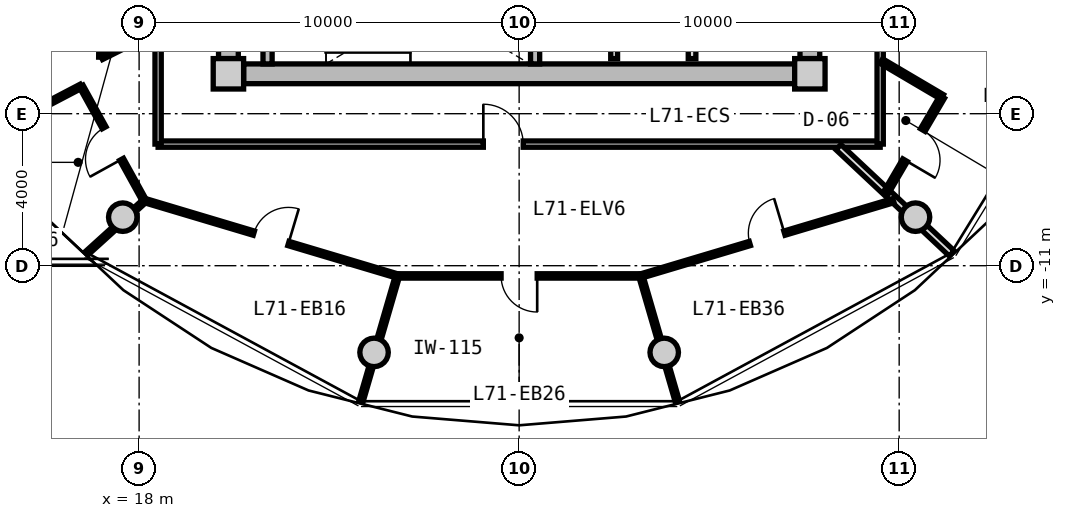
"""IFC4 building model, lengths in metres.
Left out: names, types, materials, properties, quantities, classifications, styles, units other than length and angle.
Written with IfcOpenShell. Run it as: python <this file> out.ifc"""

import sys

from ifc_helpers import new_model, si_unit, direction, frame, frame_2d, origin, origin_2d, place, context, subcontext, project, spatial, rectangle, circle, extrude, source, transform, mapped, element, fill, save


model = new_model("IFC4")
c1 = context("Model", 3, precision=1e-05, world=origin(), true_north=direction((0.0, 1.0)))
c2 = subcontext(c1, "Body", "Model", "MODEL_VIEW")
j1 = project(units=[si_unit("LENGTHUNIT", "METRE"), si_unit("PLANEANGLEUNIT", "RADIAN")], contexts=[c1])
p1 = place(None, origin())
s1 = spatial("IfcSite", under=j1, at=p1, CompositionType="ELEMENT")
p2 = place(p1, origin())
s2 = spatial("IfcBuilding", under=s1, at=p2, CompositionType="ELEMENT")
p3 = place(p2, frame((0.0, 0.0, 229.15)))
s3 = spatial("IfcBuildingStorey", under=s2, at=p3, CompositionType="ELEMENT", Elevation=229.15)
m1 = source(origin(), c2, "Body", "SweptSolid", [
    extrude(rectangle(XDim=0.8, YDim=0.8, at=origin_2d()), origin(), (0.0, 0.0, 1.0), 3.05),
])
for number, where, z_axis, x_axis in (
    (1, (20.35, -5.95, 0.0), (0.0, 0.0, 1.0), (1.0, 0.0, 0.0)),
    (2, (35.65, -5.95, 0.0), (0.0, 0.0, 1.0), (1.0, 0.0, 0.0)),
):
    element("IfcColumn", number, at=place(p3, frame(where, z_axis=z_axis, x_axis=x_axis)), inside=s3, PredefinedType="COLUMN", context=c2, shape_type="MappedRepresentation", body=[
        mapped(m1, transform((0.0, 0.0, 0.0), x_axis=(1.0, 0.0, 0.0), y_axis=(0.0, 1.0, 0.0), z_axis=(0.0, 0.0, 1.0), scale=1.0)),
    ])
m2 = source(origin(), c2, "Body", "SweptSolid", [
    extrude(rectangle(XDim=14.5, YDim=0.52, at=frame_2d((7.25, 0.0))), origin(), (0.0, 0.0, 1.0), 2.81),
])
p4 = place(p3, frame((35.25, -5.95, 0.0), z_axis=(0.0, 0.0, 1.0), x_axis=(-1.0, 0.0, 0.0)))
e3 = element("IfcWall", 3, at=p4, inside=s3, PredefinedType="SHEAR", context=c2, shape_type="MappedRepresentation", body=[
    mapped(m2, transform((0.0, 0.0, 0.0), x_axis=(1.0, 0.0, 0.0), y_axis=(0.0, 1.0, 0.0), z_axis=(0.0, 0.0, 1.0), scale=1.0)),
])
m3 = source(origin(), c2, "Body", "SweptSolid", [
    extrude(rectangle(XDim=11.1, YDim=0.52, at=frame_2d((5.55, 0.0))), origin(), (0.0, 0.0, 1.0), 2.81),
])
p5 = place(p3, frame((20.35, -5.55, 0.0), z_axis=(0.0, 0.0, 1.0), x_axis=(0.0, 1.0, 0.0)))
e4 = element("IfcWall", 4, at=p5, inside=s3, PredefinedType="SHEAR", context=c2, shape_type="MappedRepresentation", body=[
    mapped(m3, transform((0.0, 0.0, 0.0), x_axis=(1.0, 0.0, 0.0), y_axis=(0.0, 1.0, 0.0), z_axis=(0.0, 0.0, 1.0), scale=1.0)),
])
p6 = place(p5, frame((3.8, 0.0, 0.0)))
e5 = element("IfcOpeningElement", 5, at=p6, cuts=e4, PredefinedType="OPENING", context=c2, shape_type="SweptSolid", body=[
    extrude(rectangle(XDim=1.2, YDim=2.15, at=frame_2d((0.6, 1.075))), frame((0.0, 0.27, 0.0), z_axis=(0.0, -1.0, 0.0), x_axis=(1.0, 0.0, 0.0)), (0.0, 0.0, 1.0), 0.54),
])
p7 = place(p3, frame((35.65, 5.55, 0.0), z_axis=(0.0, 0.0, 1.0), x_axis=(0.0, -1.0, 0.0)))
e6 = element("IfcWall", 6, at=p7, inside=s3, PredefinedType="SHEAR", context=c2, shape_type="MappedRepresentation", body=[
    mapped(m3, transform((0.0, 0.0, 0.0), x_axis=(1.0, 0.0, 0.0), y_axis=(0.0, 1.0, 0.0), z_axis=(0.0, 0.0, 1.0), scale=1.0)),
])
p8 = place(p7, frame((5.65, 0.0, 0.0)))
e7 = element("IfcOpeningElement", 7, at=p8, cuts=e6, PredefinedType="OPENING", context=c2, shape_type="SweptSolid", body=[
    extrude(rectangle(XDim=1.2, YDim=2.15, at=frame_2d((0.6, 1.075))), frame((0.0, 0.27, 0.0), z_axis=(0.0, -1.0, 0.0), x_axis=(1.0, 0.0, 0.0)), (0.0, 0.0, 1.0), 0.54),
])
p9 = place(p7, frame((9.3, 0.0, 0.0)))
e8 = element("IfcOpeningElement", 8, at=p9, cuts=e6, PredefinedType="OPENING", context=c2, shape_type="SweptSolid", body=[
    extrude(rectangle(XDim=1.0, YDim=2.1, at=frame_2d((0.5, 1.05))), frame((0.0, 0.27, 0.0), z_axis=(0.0, -1.0, 0.0), x_axis=(1.0, 0.0, 0.0)), (0.0, 0.0, 1.0), 0.54),
])
m4 = source(origin(), c2, "Body", "SweptSolid", [
    extrude(circle(Radius=0.375, at=origin_2d()), origin(), (0.0, 0.0, 1.0), 3.05),
])
for number, where, z_axis, x_axis in (
    (9, (17.57, -9.723, 0.0), (0.0, 0.0, 1.0), (1.0, 0.0, 0.0)),
    (10, (24.182, -13.281, 0.0), (0.0, 0.0, 1.0), (1.0, 0.0, 0.0)),
    (11, (31.818, -13.281, 0.0), (0.0, 0.0, 1.0), (1.0, 0.0, 0.0)),
    (12, (38.43, -9.723, 0.0), (0.0, 0.0, 1.0), (1.0, 0.0, 0.0)),
):
    element("IfcColumn", number, at=place(p3, frame(where, z_axis=z_axis, x_axis=x_axis)), inside=s3, PredefinedType="COLUMN", context=c2, shape_type="MappedRepresentation", body=[
        mapped(m4, transform((0.0, 0.0, 0.0), x_axis=(1.0, 0.0, 0.0), y_axis=(0.0, 1.0, 0.0), z_axis=(0.0, 0.0, 1.0), scale=1.0)),
    ])
m5 = source(origin(), c2, "Body", "SweptSolid", [
    extrude(rectangle(XDim=3.24, YDim=0.24, at=frame_2d((1.62, 0.0))), origin(), (0.0, 0.0, 1.0), 2.81),
])
for number, where, z_axis, x_axis in (
    (13, (21.38, -5.69, 0.0), (0.0, 0.0, 1.0), (0.0, 1.0, 0.0)),
    (14, (28.42, -5.69, 0.0), (0.0, 0.0, 1.0), (0.0, 1.0, 0.0)),
):
    element("IfcWall", number, at=place(p3, frame(where, z_axis=z_axis, x_axis=x_axis)), inside=s3, PredefinedType="PARTITIONING", context=c2, shape_type="MappedRepresentation", body=[
        mapped(m5, transform((0.0, 0.0, 0.0), x_axis=(1.0, 0.0, 0.0), y_axis=(0.0, 1.0, 0.0), z_axis=(0.0, 0.0, 1.0), scale=1.0)),
    ])
m6 = source(origin(), c2, "Body", "SweptSolid", [
    extrude(rectangle(XDim=3.8, YDim=0.2, at=frame_2d((1.9, 0.0))), origin(), (0.0, 0.0, 1.0), 2.795),
])
p10 = place(p3, frame((32.55, -5.55, 0.0), z_axis=(0.0, 0.0, 1.0), x_axis=(0.0, 1.0, 0.0)))
e15 = element("IfcWall", 15, at=p10, inside=s3, PredefinedType="PARTITIONING", context=c2, shape_type="MappedRepresentation", body=[
    mapped(m6, transform((0.0, 0.0, 0.0), x_axis=(1.0, 0.0, 0.0), y_axis=(0.0, 1.0, 0.0), z_axis=(0.0, 0.0, 1.0), scale=1.0)),
])
m7 = source(origin(), c2, "Body", "SweptSolid", [
    extrude(rectangle(XDim=4.2, YDim=0.18, at=frame_2d((2.1, 0.0))), origin(), (0.0, 0.0, 1.0), 2.795),
])
p11 = place(p3, frame((30.5, -5.55, 0.0), z_axis=(0.0, 0.0, 1.0), x_axis=(0.0, 1.0, 0.0)))
e16 = element("IfcWall", 16, at=p11, inside=s3, PredefinedType="PARTITIONING", context=c2, shape_type="MappedRepresentation", body=[
    mapped(m7, transform((0.0, 0.0, 0.0), x_axis=(1.0, 0.0, 0.0), y_axis=(0.0, 1.0, 0.0), z_axis=(0.0, 0.0, 1.0), scale=1.0)),
])
m8 = source(origin(), c2, "Body", "SweptSolid", [
    extrude(rectangle(XDim=19.0, YDim=0.165, at=frame_2d((9.5, 0.0))), origin(), (0.0, 0.0, 1.0), 2.795),
])
p12 = place(p3, frame((37.5, -7.8, 0.0), z_axis=(0.0, 0.0, 1.0), x_axis=(-1.0, 0.0, 0.0)))
e17 = element("IfcWall", 17, at=p12, inside=s3, PredefinedType="PARTITIONING", context=c2, shape_type="MappedRepresentation", body=[
    mapped(m8, transform((0.0, 0.0, 0.0), x_axis=(1.0, 0.0, 0.0), y_axis=(0.0, 1.0, 0.0), z_axis=(0.0, 0.0, 1.0), scale=1.0)),
])
p13 = place(p12, frame((9.392, 0.0, 0.0)))
e18 = element("IfcOpeningElement", 18, at=p13, cuts=e17, PredefinedType="OPENING", context=c2, shape_type="SweptSolid", body=[
    extrude(rectangle(XDim=1.05, YDim=2.15, at=frame_2d((0.525, 1.075))), frame((0.0, 0.093, 0.0), z_axis=(0.0, -1.0, 0.0), x_axis=(1.0, 0.0, 0.0)), (0.0, 0.0, 1.0), 0.185),
])
m9 = source(origin(), c2, "Body", "SweptSolid", [
    extrude(rectangle(XDim=6.88, YDim=0.165, at=frame_2d((3.44, 0.0))), origin(), (0.0, 0.0, 1.0), 2.795),
])
p14 = place(p3, frame((18.5, -7.8, 0.0), z_axis=(0.0, 0.0, 1.0), x_axis=(0.0, 1.0, 0.0)))
e19 = element("IfcWall", 19, at=p14, inside=s3, PredefinedType="PARTITIONING", context=c2, shape_type="MappedRepresentation", body=[
    mapped(m9, transform((0.0, 0.0, 0.0), x_axis=(1.0, 0.0, 0.0), y_axis=(0.0, 1.0, 0.0), z_axis=(0.0, 0.0, 1.0), scale=1.0)),
])
p15 = place(p3, frame((37.5, -0.92, 0.0), z_axis=(0.0, 0.0, 1.0), x_axis=(0.0, -1.0, 0.0)))
e20 = element("IfcWall", 20, at=p15, inside=s3, PredefinedType="PARTITIONING", context=c2, shape_type="MappedRepresentation", body=[
    mapped(m9, transform((0.0, 0.0, 0.0), x_axis=(1.0, 0.0, 0.0), y_axis=(0.0, 1.0, 0.0), z_axis=(0.0, 0.0, 1.0), scale=1.0)),
])
p16 = place(p15, frame((2.586, 0.0, 0.0)))
e21 = element("IfcOpeningElement", 21, at=p16, cuts=e20, PredefinedType="OPENING", context=c2, shape_type="SweptSolid", body=[
    extrude(rectangle(XDim=1.05, YDim=2.15, at=frame_2d((0.525, 1.075))), frame((0.0, 0.093, 0.0), z_axis=(0.0, -1.0, 0.0), x_axis=(1.0, 0.0, 0.0)), (0.0, 0.0, 1.0), 0.185),
])
m10 = source(origin(), c2, "Body", "SweptSolid", [
    extrude(rectangle(XDim=4.089, YDim=0.19, at=frame_2d((2.044, 0.0))), origin(), (0.0, 0.0, 1.0), 2.395),
])
p17 = place(p3, frame((36.402, -7.88, 0.0), z_axis=(0.0, 0.0, 1.0), x_axis=(0.729401273609, -0.684086092577, 0.0)))
e22 = element("IfcWall", 22, at=p17, inside=s3, PredefinedType="PARTITIONING", context=c2, shape_type="MappedRepresentation", body=[
    mapped(m10, transform((0.0, 0.0, 0.0), x_axis=(1.0, 0.0, 0.0), y_axis=(0.0, 1.0, 0.0), z_axis=(0.0, 0.0, 1.0), scale=1.0)),
])
m11 = source(origin(), c2, "Body", "SweptSolid", [
    extrude(rectangle(XDim=6.936, YDim=0.115, at=frame_2d((3.468, 0.0))), origin(), (0.0, 0.0, 1.0), 2.795),
])
p18 = place(p3, frame((18.151, -9.287, 0.0), z_axis=(0.0, 0.0, 1.0), x_axis=(0.958186895835, -0.286143098205, 0.0)))
e23 = element("IfcWall", 23, at=p18, inside=s3, PredefinedType="PARTITIONING", context=c2, shape_type="MappedRepresentation", body=[
    mapped(m11, transform((0.0, 0.0, 0.0), x_axis=(1.0, 0.0, 0.0), y_axis=(0.0, 1.0, 0.0), z_axis=(0.0, 0.0, 1.0), scale=1.0)),
])
p19 = place(p18, frame((2.993, 0.0, 0.0)))
e24 = element("IfcOpeningElement", 24, at=p19, cuts=e23, PredefinedType="OPENING", context=c2, shape_type="SweptSolid", body=[
    extrude(rectangle(XDim=0.95, YDim=2.1, at=frame_2d((0.475, 1.05))), frame((0.0, 0.067, 0.0), z_axis=(0.0, -1.0, 0.0), x_axis=(1.0, 0.0, 0.0)), (0.0, 0.0, 1.0), 0.135),
])
m12 = source(origin(), c2, "Body", "SweptSolid", [
    extrude(rectangle(XDim=2.072, YDim=0.115, at=frame_2d((1.036, 0.0))), origin(), (0.0, 0.0, 1.0), 2.395),
])
p20 = place(p3, frame((18.151, -9.287, 0.0), z_axis=(0.0, 0.0, 1.0), x_axis=(-0.741410125356, -0.671052178314, 0.0)))
e25 = element("IfcWall", 25, at=p20, inside=s3, PredefinedType="PARTITIONING", context=c2, shape_type="MappedRepresentation", body=[
    mapped(m12, transform((0.0, 0.0, 0.0), x_axis=(1.0, 0.0, 0.0), y_axis=(0.0, 1.0, 0.0), z_axis=(0.0, 0.0, 1.0), scale=1.0)),
])
m13 = source(origin(), c2, "Body", "SweptSolid", [
    extrude(rectangle(XDim=6.404, YDim=0.115, at=frame_2d((3.202, 0.0))), origin(), (0.0, 0.0, 1.0), 2.795),
])
p21 = place(p3, frame((24.798, -11.269, 0.0), z_axis=(0.0, 0.0, 1.0), x_axis=(1.0, 0.0, 0.0)))
e26 = element("IfcWall", 26, at=p21, inside=s3, PredefinedType="PARTITIONING", context=c2, shape_type="MappedRepresentation", body=[
    mapped(m13, transform((0.0, 0.0, 0.0), x_axis=(1.0, 0.0, 0.0), y_axis=(0.0, 1.0, 0.0), z_axis=(0.0, 0.0, 1.0), scale=1.0)),
])
p22 = place(p21, frame((2.727, 0.0, 0.0)))
e27 = element("IfcOpeningElement", 27, at=p22, cuts=e26, PredefinedType="OPENING", context=c2, shape_type="SweptSolid", body=[
    extrude(rectangle(XDim=0.95, YDim=2.1, at=frame_2d((0.475, 1.05))), frame((0.0, 0.067, 0.0), z_axis=(0.0, -1.0, 0.0), x_axis=(1.0, 0.0, 0.0)), (0.0, 0.0, 1.0), 0.135),
])
m14 = source(origin(), c2, "Body", "SweptSolid", [
    extrude(rectangle(XDim=3.454, YDim=0.115, at=frame_2d((1.727, 0.0))), origin(), (0.0, 0.0, 1.0), 2.395),
])
p23 = place(p3, frame((24.798, -11.269, 0.0), z_axis=(0.0, 0.0, 1.0), x_axis=(-0.279348499358, -0.960189781193, 0.0)))
e28 = element("IfcWall", 28, at=p23, inside=s3, PredefinedType="PARTITIONING", context=c2, shape_type="MappedRepresentation", body=[
    mapped(m14, transform((0.0, 0.0, 0.0), x_axis=(1.0, 0.0, 0.0), y_axis=(0.0, 1.0, 0.0), z_axis=(0.0, 0.0, 1.0), scale=1.0)),
])
p24 = place(p3, frame((31.203, -11.272, 0.0), z_axis=(0.0, 0.0, 1.0), x_axis=(0.958186895835, 0.286143098205, 0.0)))
e29 = element("IfcWall", 29, at=p24, inside=s3, PredefinedType="PARTITIONING", context=c2, shape_type="MappedRepresentation", body=[
    mapped(m11, transform((0.0, 0.0, 0.0), x_axis=(1.0, 0.0, 0.0), y_axis=(0.0, 1.0, 0.0), z_axis=(0.0, 0.0, 1.0), scale=1.0)),
])
p25 = place(p24, frame((2.993, 0.0, 0.0)))
e30 = element("IfcOpeningElement", 30, at=p25, cuts=e29, PredefinedType="OPENING", context=c2, shape_type="SweptSolid", body=[
    extrude(rectangle(XDim=0.95, YDim=2.1, at=frame_2d((0.475, 1.05))), frame((0.0, 0.067, 0.0), z_axis=(0.0, -1.0, 0.0), x_axis=(1.0, 0.0, 0.0)), (0.0, 0.0, 1.0), 0.135),
])
m15 = source(origin(), c2, "Body", "SweptSolid", [
    extrude(rectangle(XDim=3.451, YDim=0.115, at=frame_2d((1.726, 0.0))), origin(), (0.0, 0.0, 1.0), 2.395),
])
p26 = place(p3, frame((31.203, -11.272, 0.0), z_axis=(0.0, 0.0, 1.0), x_axis=(0.279361559083, -0.960185981624, 0.0)))
e31 = element("IfcWall", 31, at=p26, inside=s3, PredefinedType="PARTITIONING", context=c2, shape_type="MappedRepresentation", body=[
    mapped(m15, transform((0.0, 0.0, 0.0), x_axis=(1.0, 0.0, 0.0), y_axis=(0.0, 1.0, 0.0), z_axis=(0.0, 0.0, 1.0), scale=1.0)),
])
m16 = source(origin(), c2, "Body", "SweptSolid", [
    extrude(rectangle(XDim=1.638, YDim=0.14, at=frame_2d((0.819, 0.0))), origin(), (0.0, 0.0, 1.0), 2.795),
])
p27 = place(p3, frame((18.47, -4.778, 0.0), z_axis=(0.0, 0.0, 1.0), x_axis=(-0.893919977945, -0.448226586707, 0.0)))
e32 = element("IfcWall", 32, at=p27, inside=s3, PredefinedType="PARTITIONING", context=c2, shape_type="MappedRepresentation", body=[
    mapped(m16, transform((0.0, 0.0, 0.0), x_axis=(1.0, 0.0, 0.0), y_axis=(0.0, 1.0, 0.0), z_axis=(0.0, 0.0, 1.0), scale=1.0)),
])
m17 = source(origin(), c2, "Body", "SweptSolid", [
    extrude(rectangle(XDim=2.759, YDim=0.14, at=frame_2d((1.379, 0.0))), origin(), (0.0, 0.0, 1.0), 2.795),
])
p28 = place(p3, frame((17.005, -5.513, 0.0), z_axis=(0.0, 0.0, 1.0), x_axis=(0.01194710728, 0.999928630767, 0.0)))
e33 = element("IfcWall", 33, at=p28, inside=s3, PredefinedType="PARTITIONING", context=c2, shape_type="MappedRepresentation", body=[
    mapped(m17, transform((0.0, 0.0, 0.0), x_axis=(1.0, 0.0, 0.0), y_axis=(0.0, 1.0, 0.0), z_axis=(0.0, 0.0, 1.0), scale=1.0)),
])
p29 = place(p28, frame((0.919, 0.0, 0.0)))
e34 = element("IfcOpeningElement", 34, at=p29, cuts=e33, PredefinedType="OPENING", context=c2, shape_type="SweptSolid", body=[
    extrude(rectangle(XDim=0.92, YDim=2.1, at=frame_2d((0.46, 1.05))), frame((0.0, 0.08, 0.0), z_axis=(0.0, -1.0, 0.0), x_axis=(1.0, 0.0, 0.0)), (0.0, 0.0, 1.0), 0.16),
])
m18 = source(origin(), c2, "Body", "SweptSolid", [
    extrude(rectangle(XDim=2.193, YDim=0.115, at=frame_2d((1.097, 0.0))), origin(), (0.0, 0.0, 1.0), 2.795),
])
p30 = place(p3, frame((16.475, -6.275, 0.0), z_axis=(0.0, 0.0, 1.0), x_axis=(-0.885783595046, -0.464098505435, 0.0)))
e35 = element("IfcWall", 35, at=p30, inside=s3, PredefinedType="PARTITIONING", context=c2, shape_type="MappedRepresentation", body=[
    mapped(m18, transform((0.0, 0.0, 0.0), x_axis=(1.0, 0.0, 0.0), y_axis=(0.0, 1.0, 0.0), z_axis=(0.0, 0.0, 1.0), scale=1.0)),
])
m19 = source(origin(), c2, "Body", "SweptSolid", [
    extrude(rectangle(XDim=3.45, YDim=0.115, at=frame_2d((1.725, 0.0))), origin(), (0.0, 0.0, 1.0), 2.795),
])
p31 = place(p3, frame((16.475, -6.275, 0.0), z_axis=(0.0, 0.0, 1.0), x_axis=(0.483659007882, -0.875256513312, 0.0)))
e36 = element("IfcWall", 36, at=p31, inside=s3, PredefinedType="PARTITIONING", context=c2, shape_type="MappedRepresentation", body=[
    mapped(m19, transform((0.0, 0.0, 0.0), x_axis=(1.0, 0.0, 0.0), y_axis=(0.0, 1.0, 0.0), z_axis=(0.0, 0.0, 1.0), scale=1.0)),
])
p32 = place(p31, frame((1.25, 0.0, 0.0)))
e37 = element("IfcOpeningElement", 37, at=p32, cuts=e36, PredefinedType="OPENING", context=c2, shape_type="SweptSolid", body=[
    extrude(rectangle(XDim=0.95, YDim=2.1, at=frame_2d((0.475, 1.05))), frame((0.0, 0.067, 0.0), z_axis=(0.0, -1.0, 0.0), x_axis=(1.0, 0.0, 0.0)), (0.0, 0.0, 1.0), 0.135),
])
m20 = source(origin(), c2, "Body", "SweptSolid", [
    extrude(rectangle(XDim=1.859, YDim=0.14, at=frame_2d((0.93, 0.0))), origin(), (0.0, 0.0, 1.0), 2.795),
])
p33 = place(p3, frame((37.53, -5.615, 0.0), z_axis=(0.0, 0.0, 1.0), x_axis=(0.861555897139, -0.507662718845, 0.0)))
e38 = element("IfcWall", 38, at=p33, inside=s3, PredefinedType="PARTITIONING", context=c2, shape_type="MappedRepresentation", body=[
    mapped(m20, transform((0.0, 0.0, 0.0), x_axis=(1.0, 0.0, 0.0), y_axis=(0.0, 1.0, 0.0), z_axis=(0.0, 0.0, 1.0), scale=1.0)),
])
m21 = source(origin(), c2, "Body", "SweptSolid", [
    extrude(rectangle(XDim=2.939, YDim=0.14, at=frame_2d((1.47, 0.0))), origin(), (0.0, 0.0, 1.0), 2.795),
])
p34 = place(p3, frame((39.132, -6.559, 0.0), z_axis=(0.0, 0.0, 1.0), x_axis=(-0.505883614636, -0.862601743821, 0.0)))
e39 = element("IfcWall", 39, at=p34, inside=s3, PredefinedType="PARTITIONING", context=c2, shape_type="MappedRepresentation", body=[
    mapped(m21, transform((0.0, 0.0, 0.0), x_axis=(1.0, 0.0, 0.0), y_axis=(0.0, 1.0, 0.0), z_axis=(0.0, 0.0, 1.0), scale=1.0)),
])
p35 = place(p34, frame((1.01, 0.0, 0.0)))
e40 = element("IfcOpeningElement", 40, at=p35, cuts=e39, PredefinedType="OPENING", context=c2, shape_type="SweptSolid", body=[
    extrude(rectangle(XDim=0.92, YDim=2.1, at=frame_2d((0.46, 1.05))), frame((0.0, 0.08, 0.0), z_axis=(0.0, -1.0, 0.0), x_axis=(1.0, 0.0, 0.0)), (0.0, 0.0, 1.0), 0.16),
])
m22 = source(origin(), c2, "Body", "SweptSolid", [
    extrude(rectangle(XDim=1.05, YDim=2.15, at=frame_2d((0.525, 1.075))), frame((0.0, 0.025, 0.0), z_axis=(0.0, -1.0, 0.0), x_axis=(1.0, 0.0, 0.0)), (0.0, 0.0, 1.0), 0.05),
])
p36 = place(p13, frame((1.05, 0.0, 0.0), z_axis=(0.0, 0.0, 1.0), x_axis=(-1.0, 0.0, 0.0)))
e41 = element("IfcDoor", 41, at=p36, inside=s3, OperationType="SINGLE_SWING_LEFT", PredefinedType="DOOR", context=c2, shape_type="MappedRepresentation", body=[
    mapped(m22, transform((0.0, 0.0, 0.0), x_axis=(1.0, 0.0, 0.0), y_axis=(0.0, 1.0, 0.0), z_axis=(0.0, 0.0, 1.0), scale=1.0)),
])
fill(e18, e41)
m23 = source(origin(), c2, "Body", "SweptSolid", [
    extrude(rectangle(XDim=0.95, YDim=2.1, at=frame_2d((0.475, 1.05))), frame((0.0, 0.025, 0.0), z_axis=(0.0, -1.0, 0.0), x_axis=(1.0, 0.0, 0.0)), (0.0, 0.0, 1.0), 0.05),
])
p37 = place(p32, frame((0.95, 0.0, 0.0), z_axis=(0.0, 0.0, 1.0), x_axis=(-1.0, 0.0, 0.0)))
e42 = element("IfcDoor", 42, at=p37, inside=s3, OperationType="SINGLE_SWING_LEFT", PredefinedType="DOOR", context=c2, shape_type="MappedRepresentation", body=[
    mapped(m23, transform((0.0, 0.0, 0.0), x_axis=(1.0, 0.0, 0.0), y_axis=(0.0, 1.0, 0.0), z_axis=(0.0, 0.0, 1.0), scale=1.0)),
])
fill(e37, e42)
p38 = place(p19, origin())
e43 = element("IfcDoor", 43, at=p38, inside=s3, OperationType="SINGLE_SWING_RIGHT", PredefinedType="DOOR", context=c2, shape_type="MappedRepresentation", body=[
    mapped(m23, transform((0.0, 0.0, 0.0), x_axis=(1.0, 0.0, 0.0), y_axis=(0.0, 1.0, 0.0), z_axis=(0.0, 0.0, 1.0), scale=1.0)),
])
fill(e24, e43)
p39 = place(p22, frame((0.95, 0.0, 0.0), z_axis=(0.0, 0.0, 1.0), x_axis=(-1.0, 0.0, 0.0)))
e44 = element("IfcDoor", 44, at=p39, inside=s3, OperationType="SINGLE_SWING_LEFT", PredefinedType="DOOR", context=c2, shape_type="MappedRepresentation", body=[
    mapped(m23, transform((0.0, 0.0, 0.0), x_axis=(1.0, 0.0, 0.0), y_axis=(0.0, 1.0, 0.0), z_axis=(0.0, 0.0, 1.0), scale=1.0)),
])
fill(e27, e44)
p40 = place(p25, origin())
e45 = element("IfcDoor", 45, at=p40, inside=s3, OperationType="SINGLE_SWING_RIGHT", PredefinedType="DOOR", context=c2, shape_type="MappedRepresentation", body=[
    mapped(m23, transform((0.0, 0.0, 0.0), x_axis=(1.0, 0.0, 0.0), y_axis=(0.0, 1.0, 0.0), z_axis=(0.0, 0.0, 1.0), scale=1.0)),
])
fill(e30, e45)
m24 = source(origin(), c2, "Body", "SweptSolid", [
    extrude(rectangle(XDim=0.92, YDim=2.1, at=frame_2d((0.46, 1.05))), frame((0.0, 0.025, 0.0), z_axis=(0.0, -1.0, 0.0), x_axis=(1.0, 0.0, 0.0)), (0.0, 0.0, 1.0), 0.05),
])
p41 = place(p35, origin())
e46 = element("IfcDoor", 46, at=p41, inside=s3, OperationType="SINGLE_SWING_RIGHT", PredefinedType="DOOR", context=c2, shape_type="MappedRepresentation", body=[
    mapped(m24, transform((0.0, 0.0, 0.0), x_axis=(1.0, 0.0, 0.0), y_axis=(0.0, 1.0, 0.0), z_axis=(0.0, 0.0, 1.0), scale=1.0)),
])
fill(e40, e46)
save(model, sys.argv[1])
